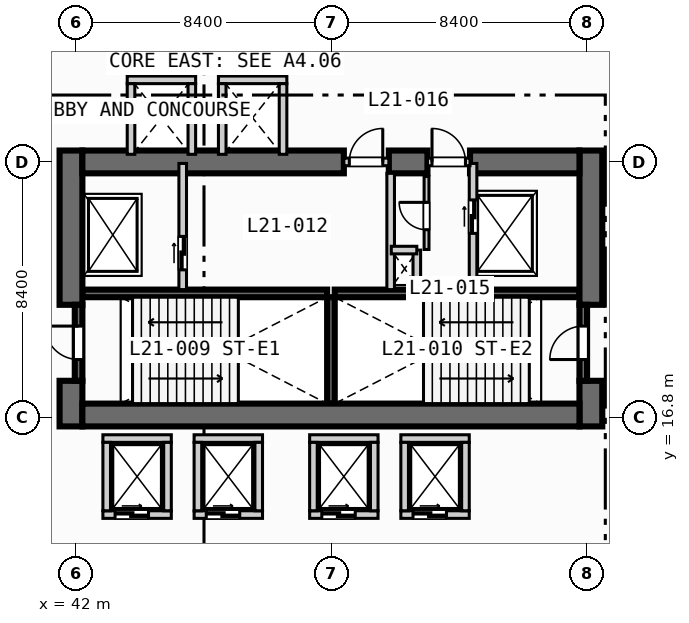
"""IFC4 building model, lengths in metres.
Left out: names, types, materials, properties, quantities, classifications, styles, units other than length and angle.
Written with IfcOpenShell. Run it as: python <this file> out.ifc"""

import sys

from ifc_helpers import new_model, si_unit, direction, frame, frame_2d, origin, place, context, subcontext, project, spatial, rectangle, extrude, element, fill, save


model = new_model("IFC4")
c1 = context("Model", 3, precision=1e-05, world=origin(), true_north=direction((0.0, 1.0)))
c2 = subcontext(c1, "Body", "Model", "MODEL_VIEW")
j1 = project(units=[si_unit("LENGTHUNIT", "METRE"), si_unit("PLANEANGLEUNIT", "RADIAN")], contexts=[c1])
p1 = place(None, origin())
s1 = spatial("IfcSite", under=j1, at=p1, CompositionType="ELEMENT")
p2 = place(p1, origin())
s2 = spatial("IfcBuilding", under=s1, at=p2, CompositionType="ELEMENT")
p3 = place(p2, frame((0.0, 0.0, 89.6)))
s3 = spatial("IfcBuildingStorey", under=s2, at=p3, CompositionType="ELEMENT", Elevation=89.6)
for number, where, z_axis, x_axis in (
    (1, (42.2, 20.875, 0.0), (0.0, 0.0, 1.0), (1.0, 0.0, 0.0)),
    (2, (50.5, 20.875, 0.0), (0.0, 0.0, 1.0), (1.0, 0.0, 0.0)),
):
    element("IfcWall", number, at=place(p3, frame(where, z_axis=z_axis, x_axis=x_axis)), inside=s3, PredefinedType="SOLIDWALL", context=c2, shape_type="SweptSolid", body=[
        extrude(rectangle(XDim=8.05, YDim=0.25, at=frame_2d((4.025, 0.0))), origin(), (0.0, 0.0, 1.0), 4.05),
    ])
p4 = place(p3, frame((50.375, 17.25, 0.0), z_axis=(0.0, 0.0, 1.0), x_axis=(0.0, 1.0, 0.0)))
e3 = element("IfcWall", 3, at=p4, inside=s3, PredefinedType="SOLIDWALL", context=c2, shape_type="SweptSolid", body=[
    extrude(rectangle(XDim=3.5, YDim=0.25, at=frame_2d((1.75, 0.0))), origin(), (0.0, 0.0, 1.0), 4.05),
])
p5 = place(p3, frame((41.825, 16.5, 0.0), z_axis=(0.0, 0.0, 1.0), x_axis=(0.0, 1.0, 0.0)))
e4 = element("IfcWall", 4, at=p5, inside=s3, PredefinedType="SHEAR", context=c2, shape_type="SweptSolid", body=[
    extrude(rectangle(XDim=1.5, YDim=0.75, at=frame_2d((0.75, 0.0))), origin(), (0.0, 0.0, 1.0), 4.05),
])
p6 = place(p3, frame((41.825, 20.5, 0.0), z_axis=(0.0, 0.0, 1.0), x_axis=(0.0, 1.0, 0.0)))
e5 = element("IfcWall", 5, at=p6, inside=s3, PredefinedType="SHEAR", context=c2, shape_type="SweptSolid", body=[
    extrude(rectangle(XDim=5.075, YDim=0.75, at=frame_2d((2.538, 0.0))), origin(), (0.0, 0.0, 1.0), 4.05),
])
p7 = place(p3, frame((58.925, 16.5, 0.0), z_axis=(0.0, 0.0, 1.0), x_axis=(0.0, 1.0, 0.0)))
e6 = element("IfcWall", 6, at=p7, inside=s3, PredefinedType="SHEAR", context=c2, shape_type="SweptSolid", body=[
    extrude(rectangle(XDim=1.5, YDim=0.75, at=frame_2d((0.75, 0.0))), origin(), (0.0, 0.0, 1.0), 4.05),
])
p8 = place(p3, frame((58.925, 20.5, 0.0), z_axis=(0.0, 0.0, 1.0), x_axis=(0.0, 1.0, 0.0)))
e7 = element("IfcWall", 7, at=p8, inside=s3, PredefinedType="SHEAR", context=c2, shape_type="SweptSolid", body=[
    extrude(rectangle(XDim=5.075, YDim=0.75, at=frame_2d((2.538, 0.0))), origin(), (0.0, 0.0, 1.0), 4.05),
])
p9 = place(p3, frame((42.2, 16.875, 0.0), z_axis=(0.0, 0.0, 1.0), x_axis=(1.0, 0.0, 0.0)))
e8 = element("IfcWall", 8, at=p9, inside=s3, PredefinedType="SHEAR", context=c2, shape_type="SweptSolid", body=[
    extrude(rectangle(XDim=16.35, YDim=0.75, at=frame_2d((8.175, 0.0))), origin(), (0.0, 0.0, 1.0), 4.05),
])
p10 = place(p3, frame((42.2, 25.2, 0.0), z_axis=(0.0, 0.0, 1.0), x_axis=(1.0, 0.0, 0.0)))
e9 = element("IfcWall", 9, at=p10, inside=s3, PredefinedType="SHEAR", context=c2, shape_type="SweptSolid", body=[
    extrude(rectangle(XDim=8.6, YDim=0.75, at=frame_2d((4.3, 0.0))), origin(), (0.0, 0.0, 1.0), 4.05),
])
p11 = place(p3, frame((52.28, 25.2, 0.0), z_axis=(0.0, 0.0, 1.0), x_axis=(1.0, 0.0, 0.0)))
e10 = element("IfcWall", 10, at=p11, inside=s3, PredefinedType="SHEAR", context=c2, shape_type="SweptSolid", body=[
    extrude(rectangle(XDim=1.27, YDim=0.75, at=frame_2d((0.635, 0.0))), origin(), (0.0, 0.0, 1.0), 4.05),
])
p12 = place(p3, frame((54.95, 25.2, 0.0), z_axis=(0.0, 0.0, 1.0), x_axis=(1.0, 0.0, 0.0)))
e11 = element("IfcWall", 11, at=p12, inside=s3, PredefinedType="SHEAR", context=c2, shape_type="SweptSolid", body=[
    extrude(rectangle(XDim=3.6, YDim=0.75, at=frame_2d((1.8, 0.0))), origin(), (0.0, 0.0, 1.0), 4.05),
])
p13 = place(p3, frame((42.075, 18.0, 0.0), z_axis=(0.0, 0.0, 1.0), x_axis=(0.0, 1.0, 0.0)))
e12 = element("IfcWall", 12, at=p13, inside=s3, PredefinedType="SOLIDWALL", context=c2, shape_type="SweptSolid", body=[
    extrude(rectangle(XDim=2.5, YDim=0.25, at=frame_2d((1.25, 0.0))), origin(), (0.0, 0.0, 1.0), 4.05),
])
p14 = place(p13, frame((0.7, 0.0, 0.0)))
e13 = element("IfcOpeningElement", 13, at=p14, cuts=e12, PredefinedType="OPENING", context=c2, shape_type="SweptSolid", body=[
    extrude(rectangle(XDim=1.1, YDim=2.15, at=frame_2d((0.55, 1.075))), frame((0.0, 0.135, 0.0), z_axis=(0.0, -1.0, 0.0), x_axis=(1.0, 0.0, 0.0)), (0.0, 0.0, 1.0), 0.27),
])
p15 = place(p3, frame((58.675, 18.0, 0.0), z_axis=(0.0, 0.0, 1.0), x_axis=(0.0, 1.0, 0.0)))
e14 = element("IfcWall", 14, at=p15, inside=s3, PredefinedType="SOLIDWALL", context=c2, shape_type="SweptSolid", body=[
    extrude(rectangle(XDim=2.5, YDim=0.25, at=frame_2d((1.25, 0.0))), origin(), (0.0, 0.0, 1.0), 4.05),
])
p16 = place(p15, frame((0.7, 0.0, 0.0)))
e15 = element("IfcOpeningElement", 15, at=p16, cuts=e14, PredefinedType="OPENING", context=c2, shape_type="SweptSolid", body=[
    extrude(rectangle(XDim=1.1, YDim=2.15, at=frame_2d((0.55, 1.075))), frame((0.0, 0.135, 0.0), z_axis=(0.0, -1.0, 0.0), x_axis=(1.0, 0.0, 0.0)), (0.0, 0.0, 1.0), 0.27),
])
p17 = place(p3, frame((45.5, 21.0, 0.0), z_axis=(0.0, 0.0, 1.0), x_axis=(0.0, 1.0, 0.0)))
e16 = element("IfcWall", 16, at=p17, inside=s3, PredefinedType="SOLIDWALL", context=c2, shape_type="SweptSolid", body=[
    extrude(rectangle(XDim=4.15, YDim=0.25, at=frame_2d((2.075, 0.0))), origin(), (0.0, 0.0, 1.0), 4.05),
])
p18 = place(p17, frame((0.65, 0.0, 0.0)))
e17 = element("IfcOpeningElement", 17, at=p18, cuts=e16, PredefinedType="OPENING", context=c2, shape_type="SweptSolid", body=[
    extrude(rectangle(XDim=1.1, YDim=2.15, at=frame_2d((0.55, 1.075))), frame((0.0, 0.135, 0.0), z_axis=(0.0, -1.0, 0.0), x_axis=(1.0, 0.0, 0.0)), (0.0, 0.0, 1.0), 0.27),
])
p19 = place(p3, frame((50.8, 25.2, 0.0), z_axis=(0.0, 0.0, 1.0), x_axis=(1.0, 0.0, 0.0)))
e18 = element("IfcWall", 18, at=p19, inside=s3, PredefinedType="SOLIDWALL", context=c2, shape_type="SweptSolid", body=[
    extrude(rectangle(XDim=1.48, YDim=0.25, at=frame_2d((0.74, 0.0))), origin(), (0.0, 0.0, 1.0), 4.05),
])
p20 = place(p19, frame((0.18, 0.0, 0.0)))
e19 = element("IfcOpeningElement", 19, at=p20, cuts=e18, PredefinedType="OPENING", context=c2, shape_type="SweptSolid", body=[
    extrude(rectangle(XDim=1.1, YDim=2.15, at=frame_2d((0.55, 1.075))), frame((0.0, 0.135, 0.0), z_axis=(0.0, -1.0, 0.0), x_axis=(1.0, 0.0, 0.0)), (0.0, 0.0, 1.0), 0.27),
])
p21 = place(p3, frame((52.34, 21.0, 0.0), z_axis=(0.0, 0.0, 1.0), x_axis=(0.0, 1.0, 0.0)))
e20 = element("IfcWall", 20, at=p21, inside=s3, PredefinedType="SOLIDWALL", context=c2, shape_type="SweptSolid", body=[
    extrude(rectangle(XDim=3.825, YDim=0.25, at=frame_2d((1.913, 0.0))), origin(), (0.0, 0.0, 1.0), 4.05),
])
p22 = place(p3, frame((55.05, 21.0, 0.0), z_axis=(0.0, 0.0, 1.0), x_axis=(0.0, 1.0, 0.0)))
e21 = element("IfcWall", 21, at=p22, inside=s3, PredefinedType="SOLIDWALL", context=c2, shape_type="SweptSolid", body=[
    extrude(rectangle(XDim=4.15, YDim=0.25, at=frame_2d((2.075, 0.0))), origin(), (0.0, 0.0, 1.0), 4.05),
])
p23 = place(p22, frame((1.85, 0.0, 0.0)))
e22 = element("IfcOpeningElement", 22, at=p23, cuts=e21, PredefinedType="OPENING", context=c2, shape_type="SweptSolid", body=[
    extrude(rectangle(XDim=1.1, YDim=2.15, at=frame_2d((0.55, 1.075))), frame((0.0, 0.135, 0.0), z_axis=(0.0, -1.0, 0.0), x_axis=(1.0, 0.0, 0.0)), (0.0, 0.0, 1.0), 0.27),
])
p24 = place(p3, frame((53.55, 25.2, 0.0), z_axis=(0.0, 0.0, 1.0), x_axis=(1.0, 0.0, 0.0)))
e23 = element("IfcWall", 23, at=p24, inside=s3, PredefinedType="SOLIDWALL", context=c2, shape_type="SweptSolid", body=[
    extrude(rectangle(XDim=1.4, YDim=0.25, at=frame_2d((0.7, 0.0))), origin(), (0.0, 0.0, 1.0), 4.05),
])
p25 = place(p24, frame((0.15, 0.0, 0.0)))
e24 = element("IfcOpeningElement", 24, at=p25, cuts=e23, PredefinedType="OPENING", context=c2, shape_type="SweptSolid", body=[
    extrude(rectangle(XDim=1.1, YDim=2.15, at=frame_2d((0.55, 1.075))), frame((0.0, 0.135, 0.0), z_axis=(0.0, -1.0, 0.0), x_axis=(1.0, 0.0, 0.0)), (0.0, 0.0, 1.0), 0.27),
])
p26 = place(p3, frame((53.2, 21.0, 0.0), z_axis=(0.0, 0.0, 1.0), x_axis=(0.0, 1.0, 0.0)))
e25 = element("IfcWall", 25, at=p26, inside=s3, PredefinedType="SOLIDWALL", context=c2, shape_type="SweptSolid", body=[
    extrude(rectangle(XDim=1.3, YDim=0.25, at=frame_2d((0.65, 0.0))), origin(), (0.0, 0.0, 1.0), 4.05),
])
p27 = place(p3, frame((52.36, 22.3, 0.0), z_axis=(0.0, 0.0, 1.0), x_axis=(1.0, 0.0, 0.0)))
e26 = element("IfcWall", 26, at=p27, inside=s3, PredefinedType="SOLIDWALL", context=c2, shape_type="SweptSolid", body=[
    extrude(rectangle(XDim=0.84, YDim=0.25, at=frame_2d((0.42, 0.0))), origin(), (0.0, 0.0, 1.0), 4.05),
])
p28 = place(p3, frame((53.52, 22.32, 0.0), z_axis=(0.0, 0.0, 1.0), x_axis=(0.0, 1.0, 0.0)))
e27 = element("IfcWall", 27, at=p28, inside=s3, PredefinedType="PARTITIONING", context=c2, shape_type="SweptSolid", body=[
    extrude(rectangle(XDim=2.4, YDim=0.16, at=frame_2d((1.2, 0.0))), origin(), (0.0, 0.0, 1.0), 4.05),
])
p29 = place(p28, frame((0.65, 0.0, 0.0)))
e28 = element("IfcOpeningElement", 28, at=p29, cuts=e27, PredefinedType="OPENING", context=c2, shape_type="SweptSolid", body=[
    extrude(rectangle(XDim=0.9, YDim=2.1, at=frame_2d((0.45, 1.05))), frame((0.0, 0.09, 0.0), z_axis=(0.0, -1.0, 0.0), x_axis=(1.0, 0.0, 0.0)), (0.0, 0.0, 1.0), 0.18),
])
p30 = place(p3, frame((42.875, 13.6, 0.0), z_axis=(0.0, 0.0, 1.0), x_axis=(1.0, 0.0, 0.0)))
e29 = element("IfcWall", 29, at=p30, inside=s3, PredefinedType="SOLIDWALL", context=c2, shape_type="SweptSolid", body=[
    extrude(rectangle(XDim=2.25, YDim=0.25, at=frame_2d((1.125, 0.0))), origin(), (0.0, 0.0, 1.0), 4.05),
])
p31 = place(p30, frame((0.4, 0.0, 0.0)))
e30 = element("IfcOpeningElement", 30, at=p31, cuts=e29, PredefinedType="OPENING", context=c2, shape_type="SweptSolid", body=[
    extrude(rectangle(XDim=1.1, YDim=2.15, at=frame_2d((0.55, 1.075))), frame((0.0, 0.135, 0.0), z_axis=(0.0, -1.0, 0.0), x_axis=(1.0, 0.0, 0.0)), (0.0, 0.0, 1.0), 0.27),
])
for number, where, z_axis, x_axis in (
    (31, (42.875, 16.1, 0.0), (0.0, 0.0, 1.0), (1.0, 0.0, 0.0)),
    (32, (43.0, 13.725, 0.0), (0.0, 0.0, 1.0), (0.0, 1.0, 0.0)),
    (33, (45.0, 13.725, 0.0), (0.0, 0.0, 1.0), (0.0, 1.0, 0.0)),
):
    element("IfcWall", number, at=place(p3, frame(where, z_axis=z_axis, x_axis=x_axis)), inside=s3, PredefinedType="SOLIDWALL", context=c2, shape_type="SweptSolid", body=[
        extrude(rectangle(XDim=2.25, YDim=0.25, at=frame_2d((1.125, 0.0))), origin(), (0.0, 0.0, 1.0), 4.05),
    ])
p32 = place(p3, frame((45.875, 13.6, 0.0), z_axis=(0.0, 0.0, 1.0), x_axis=(1.0, 0.0, 0.0)))
e34 = element("IfcWall", 34, at=p32, inside=s3, PredefinedType="SOLIDWALL", context=c2, shape_type="SweptSolid", body=[
    extrude(rectangle(XDim=2.25, YDim=0.25, at=frame_2d((1.125, 0.0))), origin(), (0.0, 0.0, 1.0), 4.05),
])
p33 = place(p32, frame((0.4, 0.0, 0.0)))
e35 = element("IfcOpeningElement", 35, at=p33, cuts=e34, PredefinedType="OPENING", context=c2, shape_type="SweptSolid", body=[
    extrude(rectangle(XDim=1.1, YDim=2.15, at=frame_2d((0.55, 1.075))), frame((0.0, 0.135, 0.0), z_axis=(0.0, -1.0, 0.0), x_axis=(1.0, 0.0, 0.0)), (0.0, 0.0, 1.0), 0.27),
])
for number, where, z_axis, x_axis in (
    (36, (45.875, 16.1, 0.0), (0.0, 0.0, 1.0), (1.0, 0.0, 0.0)),
    (37, (46.0, 13.725, 0.0), (0.0, 0.0, 1.0), (0.0, 1.0, 0.0)),
    (38, (48.0, 13.725, 0.0), (0.0, 0.0, 1.0), (0.0, 1.0, 0.0)),
):
    element("IfcWall", number, at=place(p3, frame(where, z_axis=z_axis, x_axis=x_axis)), inside=s3, PredefinedType="SOLIDWALL", context=c2, shape_type="SweptSolid", body=[
        extrude(rectangle(XDim=2.25, YDim=0.25, at=frame_2d((1.125, 0.0))), origin(), (0.0, 0.0, 1.0), 4.05),
    ])
p34 = place(p3, frame((49.675, 13.6, 0.0), z_axis=(0.0, 0.0, 1.0), x_axis=(1.0, 0.0, 0.0)))
e39 = element("IfcWall", 39, at=p34, inside=s3, PredefinedType="SOLIDWALL", context=c2, shape_type="SweptSolid", body=[
    extrude(rectangle(XDim=2.25, YDim=0.25, at=frame_2d((1.125, 0.0))), origin(), (0.0, 0.0, 1.0), 4.05),
])
p35 = place(p34, frame((0.4, 0.0, 0.0)))
e40 = element("IfcOpeningElement", 40, at=p35, cuts=e39, PredefinedType="OPENING", context=c2, shape_type="SweptSolid", body=[
    extrude(rectangle(XDim=1.1, YDim=2.15, at=frame_2d((0.55, 1.075))), frame((0.0, 0.135, 0.0), z_axis=(0.0, -1.0, 0.0), x_axis=(1.0, 0.0, 0.0)), (0.0, 0.0, 1.0), 0.27),
])
for number, where, z_axis, x_axis in (
    (41, (49.675, 16.1, 0.0), (0.0, 0.0, 1.0), (1.0, 0.0, 0.0)),
    (42, (49.8, 13.725, 0.0), (0.0, 0.0, 1.0), (0.0, 1.0, 0.0)),
    (43, (51.8, 13.725, 0.0), (0.0, 0.0, 1.0), (0.0, 1.0, 0.0)),
):
    element("IfcWall", number, at=place(p3, frame(where, z_axis=z_axis, x_axis=x_axis)), inside=s3, PredefinedType="SOLIDWALL", context=c2, shape_type="SweptSolid", body=[
        extrude(rectangle(XDim=2.25, YDim=0.25, at=frame_2d((1.125, 0.0))), origin(), (0.0, 0.0, 1.0), 4.05),
    ])
p36 = place(p3, frame((52.675, 13.6, 0.0), z_axis=(0.0, 0.0, 1.0), x_axis=(1.0, 0.0, 0.0)))
e44 = element("IfcWall", 44, at=p36, inside=s3, PredefinedType="SOLIDWALL", context=c2, shape_type="SweptSolid", body=[
    extrude(rectangle(XDim=2.25, YDim=0.25, at=frame_2d((1.125, 0.0))), origin(), (0.0, 0.0, 1.0), 4.05),
])
p37 = place(p36, frame((0.4, 0.0, 0.0)))
e45 = element("IfcOpeningElement", 45, at=p37, cuts=e44, PredefinedType="OPENING", context=c2, shape_type="SweptSolid", body=[
    extrude(rectangle(XDim=1.1, YDim=2.15, at=frame_2d((0.55, 1.075))), frame((0.0, 0.135, 0.0), z_axis=(0.0, -1.0, 0.0), x_axis=(1.0, 0.0, 0.0)), (0.0, 0.0, 1.0), 0.27),
])
for number, where, z_axis, x_axis in (
    (46, (52.675, 16.1, 0.0), (0.0, 0.0, 1.0), (1.0, 0.0, 0.0)),
    (47, (52.8, 13.725, 0.0), (0.0, 0.0, 1.0), (0.0, 1.0, 0.0)),
    (48, (54.8, 13.725, 0.0), (0.0, 0.0, 1.0), (0.0, 1.0, 0.0)),
    (49, (43.675, 27.9, 0.0), (0.0, 0.0, 1.0), (1.0, 0.0, 0.0)),
):
    element("IfcWall", number, at=place(p3, frame(where, z_axis=z_axis, x_axis=x_axis)), inside=s3, PredefinedType="SOLIDWALL", context=c2, shape_type="SweptSolid", body=[
        extrude(rectangle(XDim=2.25, YDim=0.25, at=frame_2d((1.125, 0.0))), origin(), (0.0, 0.0, 1.0), 4.05),
    ])
for number, where, z_axis, x_axis in (
    (50, (43.8, 25.45, 0.0), (0.0, 0.0, 1.0), (0.0, 1.0, 0.0)),
    (51, (45.8, 25.45, 0.0), (0.0, 0.0, 1.0), (0.0, 1.0, 0.0)),
):
    element("IfcWall", number, at=place(p3, frame(where, z_axis=z_axis, x_axis=x_axis)), inside=s3, PredefinedType="SOLIDWALL", context=c2, shape_type="SweptSolid", body=[
        extrude(rectangle(XDim=2.325, YDim=0.25, at=frame_2d((1.163, 0.0))), origin(), (0.0, 0.0, 1.0), 4.05),
    ])
p38 = place(p3, frame((45.96, 26.6, 0.0), z_axis=(0.0, 0.0, 1.0), x_axis=(1.0, 0.0, 0.0)))
e52 = element("IfcWall", 52, at=p38, inside=s3, PredefinedType="PARTITIONING", context=c2, shape_type="SweptSolid", body=[
    extrude(rectangle(XDim=0.88, YDim=0.16, at=frame_2d((0.44, 0.0))), origin(), (0.0, 0.0, 1.0), 4.05),
])
p39 = place(p3, frame((46.675, 27.9, 0.0), z_axis=(0.0, 0.0, 1.0), x_axis=(1.0, 0.0, 0.0)))
e53 = element("IfcWall", 53, at=p39, inside=s3, PredefinedType="SOLIDWALL", context=c2, shape_type="SweptSolid", body=[
    extrude(rectangle(XDim=2.25, YDim=0.25, at=frame_2d((1.125, 0.0))), origin(), (0.0, 0.0, 1.0), 4.05),
])
for number, where, z_axis, x_axis in (
    (54, (46.8, 25.45, 0.0), (0.0, 0.0, 1.0), (0.0, 1.0, 0.0)),
    (55, (48.8, 25.45, 0.0), (0.0, 0.0, 1.0), (0.0, 1.0, 0.0)),
):
    element("IfcWall", number, at=place(p3, frame(where, z_axis=z_axis, x_axis=x_axis)), inside=s3, PredefinedType="SOLIDWALL", context=c2, shape_type="SweptSolid", body=[
        extrude(rectangle(XDim=2.325, YDim=0.25, at=frame_2d((1.163, 0.0))), origin(), (0.0, 0.0, 1.0), 4.05),
    ])
p40 = place(p14, origin())
e56 = element("IfcDoor", 56, at=p40, inside=s3, OperationType="SINGLE_SWING_RIGHT", PredefinedType="DOOR", context=c2, shape_type="SweptSolid", body=[
    extrude(rectangle(XDim=1.1, YDim=2.15, at=frame_2d((0.55, 1.075))), frame((0.0, 0.025, 0.0), z_axis=(0.0, -1.0, 0.0), x_axis=(1.0, 0.0, 0.0)), (0.0, 0.0, 1.0), 0.05),
])
fill(e13, e56)
p41 = place(p16, origin())
e57 = element("IfcDoor", 57, at=p41, inside=s3, OperationType="SINGLE_SWING_LEFT", PredefinedType="DOOR", context=c2, shape_type="SweptSolid", body=[
    extrude(rectangle(XDim=1.1, YDim=2.15, at=frame_2d((0.55, 1.075))), frame((0.0, 0.025, 0.0), z_axis=(0.0, -1.0, 0.0), x_axis=(1.0, 0.0, 0.0)), (0.0, 0.0, 1.0), 0.05),
])
fill(e15, e57)
p42 = place(p18, origin())
e58 = element("IfcDoor", 58, at=p42, inside=s3, OperationType="SLIDING_TO_LEFT", PredefinedType="DOOR", context=c2, shape_type="SweptSolid", body=[
    extrude(rectangle(XDim=1.1, YDim=2.15, at=frame_2d((0.55, 1.075))), frame((0.0, 0.025, 0.0), z_axis=(0.0, -1.0, 0.0), x_axis=(1.0, 0.0, 0.0)), (0.0, 0.0, 1.0), 0.05),
])
fill(e17, e58)
p43 = place(p20, origin())
e59 = element("IfcDoor", 59, at=p43, inside=s3, OperationType="SINGLE_SWING_RIGHT", PredefinedType="DOOR", context=c2, shape_type="SweptSolid", body=[
    extrude(rectangle(XDim=1.1, YDim=2.15, at=frame_2d((0.55, 1.075))), frame((0.0, 0.025, 0.0), z_axis=(0.0, -1.0, 0.0), x_axis=(1.0, 0.0, 0.0)), (0.0, 0.0, 1.0), 0.05),
])
fill(e19, e59)
p44 = place(p23, origin())
e60 = element("IfcDoor", 60, at=p44, inside=s3, OperationType="SLIDING_TO_LEFT", PredefinedType="DOOR", context=c2, shape_type="SweptSolid", body=[
    extrude(rectangle(XDim=1.1, YDim=2.15, at=frame_2d((0.55, 1.075))), frame((0.0, 0.025, 0.0), z_axis=(0.0, -1.0, 0.0), x_axis=(1.0, 0.0, 0.0)), (0.0, 0.0, 1.0), 0.05),
])
fill(e22, e60)
p45 = place(p25, origin())
e61 = element("IfcDoor", 61, at=p45, inside=s3, OperationType="SINGLE_SWING_LEFT", PredefinedType="DOOR", context=c2, shape_type="SweptSolid", body=[
    extrude(rectangle(XDim=1.1, YDim=2.15, at=frame_2d((0.55, 1.075))), frame((0.0, 0.025, 0.0), z_axis=(0.0, -1.0, 0.0), x_axis=(1.0, 0.0, 0.0)), (0.0, 0.0, 1.0), 0.05),
])
fill(e24, e61)
p46 = place(p29, origin())
e62 = element("IfcDoor", 62, at=p46, inside=s3, OperationType="SINGLE_SWING_RIGHT", PredefinedType="DOOR", context=c2, shape_type="SweptSolid", body=[
    extrude(rectangle(XDim=0.9, YDim=2.1, at=frame_2d((0.45, 1.05))), frame((0.0, 0.025, 0.0), z_axis=(0.0, -1.0, 0.0), x_axis=(1.0, 0.0, 0.0)), (0.0, 0.0, 1.0), 0.05),
])
fill(e28, e62)
p47 = place(p31, origin())
e63 = element("IfcDoor", 63, at=p47, inside=s3, OperationType="SLIDING_TO_LEFT", PredefinedType="DOOR", context=c2, shape_type="SweptSolid", body=[
    extrude(rectangle(XDim=1.1, YDim=2.15, at=frame_2d((0.55, 1.075))), frame((0.0, 0.025, 0.0), z_axis=(0.0, -1.0, 0.0), x_axis=(1.0, 0.0, 0.0)), (0.0, 0.0, 1.0), 0.05),
])
fill(e30, e63)
p48 = place(p33, origin())
e64 = element("IfcDoor", 64, at=p48, inside=s3, OperationType="SLIDING_TO_LEFT", PredefinedType="DOOR", context=c2, shape_type="SweptSolid", body=[
    extrude(rectangle(XDim=1.1, YDim=2.15, at=frame_2d((0.55, 1.075))), frame((0.0, 0.025, 0.0), z_axis=(0.0, -1.0, 0.0), x_axis=(1.0, 0.0, 0.0)), (0.0, 0.0, 1.0), 0.05),
])
fill(e35, e64)
p49 = place(p35, origin())
e65 = element("IfcDoor", 65, at=p49, inside=s3, OperationType="SLIDING_TO_LEFT", PredefinedType="DOOR", context=c2, shape_type="SweptSolid", body=[
    extrude(rectangle(XDim=1.1, YDim=2.15, at=frame_2d((0.55, 1.075))), frame((0.0, 0.025, 0.0), z_axis=(0.0, -1.0, 0.0), x_axis=(1.0, 0.0, 0.0)), (0.0, 0.0, 1.0), 0.05),
])
fill(e40, e65)
p50 = place(p37, origin())
e66 = element("IfcDoor", 66, at=p50, inside=s3, OperationType="SLIDING_TO_LEFT", PredefinedType="DOOR", context=c2, shape_type="SweptSolid", body=[
    extrude(rectangle(XDim=1.1, YDim=2.15, at=frame_2d((0.55, 1.075))), frame((0.0, 0.025, 0.0), z_axis=(0.0, -1.0, 0.0), x_axis=(1.0, 0.0, 0.0)), (0.0, 0.0, 1.0), 0.05),
])
fill(e45, e66)
save(model, sys.argv[1])
